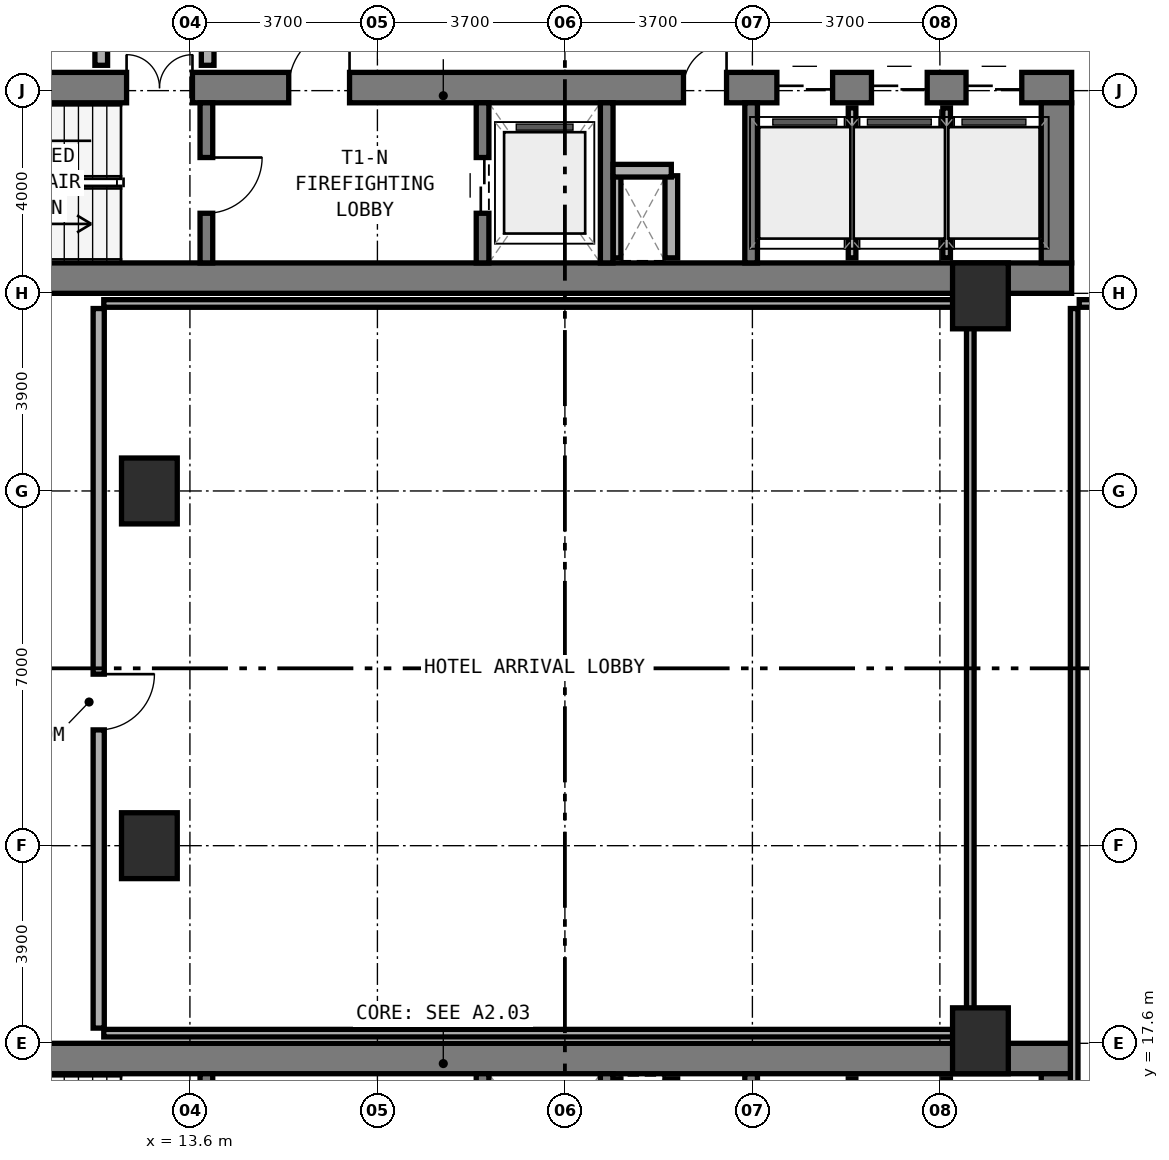
"""IFC4 building model, lengths in metres.
Left out: names, types, materials, properties, quantities, classifications, styles, units other than length and angle.
Written with IfcOpenShell. Run it as: python <this file> out.ifc"""

import sys

from ifc_helpers import new_model, si_unit, direction, frame, frame_2d, origin, origin_2d, place, context, subcontext, project, spatial, rectangle, extrude, element, fill, save


model = new_model("IFC4")
c1 = context("Model", 3, precision=1e-05, world=origin(), true_north=direction((0.0, 1.0)))
c2 = subcontext(c1, "Body", "Model", "MODEL_VIEW")
j1 = project(units=[si_unit("LENGTHUNIT", "METRE"), si_unit("PLANEANGLEUNIT", "RADIAN")], contexts=[c1])
p1 = place(None, origin())
s1 = spatial("IfcSite", under=j1, at=p1, CompositionType="ELEMENT")
p2 = place(p1, origin())
s2 = spatial("IfcBuilding", under=s1, at=p2, CompositionType="ELEMENT")
p3 = place(p2, origin())
s3 = spatial("IfcBuildingStorey", under=s2, at=p3, CompositionType="ELEMENT", Elevation=0.0)
p4 = place(p3, frame((6.2, 32.7, 0.0), z_axis=(0.0, 0.0, 1.0), x_axis=(1.0, 0.0, 0.0)))
e1 = element("IfcWall", 1, at=p4, inside=s3, PredefinedType="SHEAR", context=c2, shape_type="SweptSolid", body=[
    extrude(rectangle(XDim=24.8, YDim=0.6, at=frame_2d((12.4, 0.0))), origin(), (0.0, 0.0, 1.0), 5.4),
])
p5 = place(p3, frame((6.2, 36.46, 0.0), z_axis=(0.0, 0.0, 1.0), x_axis=(1.0, 0.0, 0.0)))
e2 = element("IfcWall", 2, at=p5, inside=s3, PredefinedType="SHEAR", context=c2, shape_type="SweptSolid", body=[
    extrude(rectangle(XDim=24.8, YDim=0.6, at=frame_2d((12.4, 0.0))), origin(), (0.0, 0.0, 1.0), 5.4),
])
p6 = place(p5, frame((9.35, 0.0, 0.0)))
e3 = element("IfcOpeningElement", 3, at=p6, cuts=e2, PredefinedType="OPENING", context=c2, shape_type="SweptSolid", body=[
    extrude(rectangle(XDim=1.2, YDim=2.15, at=frame_2d((0.6, 1.075))), frame((0.0, 0.31, 0.0), z_axis=(0.0, -1.0, 0.0), x_axis=(1.0, 0.0, 0.0)), (0.0, 0.0, 1.0), 0.62),
])
p7 = place(p5, frame((6.15, 0.0, 0.0)))
e4 = element("IfcOpeningElement", 4, at=p7, cuts=e2, PredefinedType="OPENING", context=c2, shape_type="SweptSolid", body=[
    extrude(rectangle(XDim=1.3, YDim=2.15, at=frame_2d((0.65, 1.075))), frame((0.0, 0.31, 0.0), z_axis=(0.0, -1.0, 0.0), x_axis=(1.0, 0.0, 0.0)), (0.0, 0.0, 1.0), 0.62),
])
p8 = place(p5, frame((17.14, 0.0, 0.0)))
e5 = element("IfcOpeningElement", 5, at=p8, cuts=e2, PredefinedType="OPENING", context=c2, shape_type="SweptSolid", body=[
    extrude(rectangle(XDim=0.85, YDim=2.1, at=frame_2d((0.425, 1.05))), frame((0.0, 0.31, 0.0), z_axis=(0.0, -1.0, 0.0), x_axis=(1.0, 0.0, 0.0)), (0.0, 0.0, 1.0), 0.62),
])
p9 = place(p5, frame((18.983, 0.0, 0.0)))
e6 = element("IfcOpeningElement", 6, at=p9, cuts=e2, PredefinedType="OPENING", context=c2, shape_type="SweptSolid", body=[
    extrude(rectangle(XDim=1.1, YDim=2.15, at=frame_2d((0.55, 1.075))), frame((0.0, 0.31, 0.0), z_axis=(0.0, -1.0, 0.0), x_axis=(1.0, 0.0, 0.0)), (0.0, 0.0, 1.0), 0.62),
])
p10 = place(p5, frame((20.85, 0.0, 0.0)))
e7 = element("IfcOpeningElement", 7, at=p10, cuts=e2, PredefinedType="OPENING", context=c2, shape_type="SweptSolid", body=[
    extrude(rectangle(XDim=1.1, YDim=2.15, at=frame_2d((0.55, 1.075))), frame((0.0, 0.31, 0.0), z_axis=(0.0, -1.0, 0.0), x_axis=(1.0, 0.0, 0.0)), (0.0, 0.0, 1.0), 0.62),
])
p11 = place(p5, frame((22.716, 0.0, 0.0)))
e8 = element("IfcOpeningElement", 8, at=p11, cuts=e2, PredefinedType="OPENING", context=c2, shape_type="SweptSolid", body=[
    extrude(rectangle(XDim=1.1, YDim=2.15, at=frame_2d((0.55, 1.075))), frame((0.0, 0.31, 0.0), z_axis=(0.0, -1.0, 0.0), x_axis=(1.0, 0.0, 0.0)), (0.0, 0.0, 1.0), 0.62),
])
p12 = place(p3, frame((30.7, 33.0, 0.0), z_axis=(0.0, 0.0, 1.0), x_axis=(0.0, 1.0, 0.0)))
e9 = element("IfcWall", 9, at=p12, inside=s3, PredefinedType="SHEAR", context=c2, shape_type="SweptSolid", body=[
    extrude(rectangle(XDim=3.16, YDim=0.6, at=frame_2d((1.58, 0.0))), origin(), (0.0, 0.0, 1.0), 5.4),
])
p13 = place(p3, frame((13.925, 33.0, 0.0), z_axis=(0.0, 0.0, 1.0), x_axis=(0.0, 1.0, 0.0)))
e10 = element("IfcWall", 10, at=p13, inside=s3, PredefinedType="STANDARD", context=c2, shape_type="SweptSolid", body=[
    extrude(rectangle(XDim=3.16, YDim=0.25, at=frame_2d((1.58, 0.0))), origin(), (0.0, 0.0, 1.0), 5.05),
])
p14 = place(p13, frame((0.98, 0.0, 0.0)))
e11 = element("IfcOpeningElement", 11, at=p14, cuts=e10, PredefinedType="OPENING", context=c2, shape_type="SweptSolid", body=[
    extrude(rectangle(XDim=1.1, YDim=2.15, at=frame_2d((0.55, 1.075))), frame((0.0, 0.135, 0.0), z_axis=(0.0, -1.0, 0.0), x_axis=(1.0, 0.0, 0.0)), (0.0, 0.0, 1.0), 0.27),
])
p15 = place(p3, frame((19.375, 33.0, 0.0), z_axis=(0.0, 0.0, 1.0), x_axis=(0.0, 1.0, 0.0)))
e12 = element("IfcWall", 12, at=p15, inside=s3, PredefinedType="STANDARD", context=c2, shape_type="SweptSolid", body=[
    extrude(rectangle(XDim=3.16, YDim=0.25, at=frame_2d((1.58, 0.0))), origin(), (0.0, 0.0, 1.0), 5.05),
])
p16 = place(p15, frame((0.98, 0.0, 0.0)))
e13 = element("IfcOpeningElement", 13, at=p16, cuts=e12, PredefinedType="OPENING", context=c2, shape_type="SweptSolid", body=[
    extrude(rectangle(XDim=1.1, YDim=2.15, at=frame_2d((0.55, 1.075))), frame((0.0, 0.135, 0.0), z_axis=(0.0, -1.0, 0.0), x_axis=(1.0, 0.0, 0.0)), (0.0, 0.0, 1.0), 0.27),
])
for number, where, z_axis, x_axis in (
    (14, (21.825, 33.0, 0.0), (0.0, 0.0, 1.0), (0.0, 1.0, 0.0)),
    (15, (24.675, 33.0, 0.0), (0.0, 0.0, 1.0), (0.0, 1.0, 0.0)),
):
    element("IfcWall", number, at=place(p3, frame(where, z_axis=z_axis, x_axis=x_axis)), inside=s3, PredefinedType="STANDARD", context=c2, shape_type="SweptSolid", body=[
        extrude(rectangle(XDim=3.16, YDim=0.25, at=frame_2d((1.58, 0.0))), origin(), (0.0, 0.0, 1.0), 5.05),
    ])
p17 = place(p3, frame((6.2, 17.3, 0.0), z_axis=(0.0, 0.0, 1.0), x_axis=(1.0, 0.0, 0.0)))
e16 = element("IfcWall", 16, at=p17, inside=s3, PredefinedType="SHEAR", context=c2, shape_type="SweptSolid", body=[
    extrude(rectangle(XDim=24.8, YDim=0.6, at=frame_2d((12.4, 0.0))), origin(), (0.0, 0.0, 1.0), 5.4),
])
p18 = place(p3, frame((30.7, 13.84, 0.0), z_axis=(0.0, 0.0, 1.0), x_axis=(0.0, 1.0, 0.0)))
e17 = element("IfcWall", 17, at=p18, inside=s3, PredefinedType="SHEAR", context=c2, shape_type="SweptSolid", body=[
    extrude(rectangle(XDim=3.16, YDim=0.6, at=frame_2d((1.58, 0.0))), origin(), (0.0, 0.0, 1.0), 5.4),
])
p19 = place(p3, frame((13.925, 13.84, 0.0), z_axis=(0.0, 0.0, 1.0), x_axis=(0.0, 1.0, 0.0)))
e18 = element("IfcWall", 18, at=p19, inside=s3, PredefinedType="STANDARD", context=c2, shape_type="SweptSolid", body=[
    extrude(rectangle(XDim=3.16, YDim=0.25, at=frame_2d((1.58, 0.0))), origin(), (0.0, 0.0, 1.0), 5.05),
])
p20 = place(p19, frame((0.98, 0.0, 0.0)))
e19 = element("IfcOpeningElement", 19, at=p20, cuts=e18, PredefinedType="OPENING", context=c2, shape_type="SweptSolid", body=[
    extrude(rectangle(XDim=1.1, YDim=2.15, at=frame_2d((0.55, 1.075))), frame((0.0, 0.135, 0.0), z_axis=(0.0, -1.0, 0.0), x_axis=(1.0, 0.0, 0.0)), (0.0, 0.0, 1.0), 0.27),
])
p21 = place(p3, frame((19.375, 13.84, 0.0), z_axis=(0.0, 0.0, 1.0), x_axis=(0.0, 1.0, 0.0)))
e20 = element("IfcWall", 20, at=p21, inside=s3, PredefinedType="STANDARD", context=c2, shape_type="SweptSolid", body=[
    extrude(rectangle(XDim=3.16, YDim=0.25, at=frame_2d((1.58, 0.0))), origin(), (0.0, 0.0, 1.0), 5.05),
])
p22 = place(p21, frame((0.98, 0.0, 0.0)))
e21 = element("IfcOpeningElement", 21, at=p22, cuts=e20, PredefinedType="OPENING", context=c2, shape_type="SweptSolid", body=[
    extrude(rectangle(XDim=1.1, YDim=2.15, at=frame_2d((0.55, 1.075))), frame((0.0, 0.135, 0.0), z_axis=(0.0, -1.0, 0.0), x_axis=(1.0, 0.0, 0.0)), (0.0, 0.0, 1.0), 0.27),
])
for number, where, z_axis, x_axis in (
    (22, (21.825, 13.84, 0.0), (0.0, 0.0, 1.0), (0.0, 1.0, 0.0)),
    (23, (24.675, 13.84, 0.0), (0.0, 0.0, 1.0), (0.0, 1.0, 0.0)),
):
    element("IfcWall", number, at=place(p3, frame(where, z_axis=z_axis, x_axis=x_axis)), inside=s3, PredefinedType="STANDARD", context=c2, shape_type="SweptSolid", body=[
        extrude(rectangle(XDim=3.16, YDim=0.25, at=frame_2d((1.58, 0.0))), origin(), (0.0, 0.0, 1.0), 5.05),
    ])
for number, where, z_axis, x_axis in (
    (24, (12.8, 21.5, 0.0), (0.0, 0.0, 1.0), (1.0, 0.0, 0.0)),
    (25, (12.8, 28.5, 0.0), (0.0, 0.0, 1.0), (1.0, 0.0, 0.0)),
    (26, (29.2, 17.65, 0.0), (0.0, 0.0, 1.0), (1.0, 0.0, 0.0)),
    (27, (29.2, 32.35, 0.0), (0.0, 0.0, 1.0), (1.0, 0.0, 0.0)),
):
    element("IfcColumn", number, at=place(p3, frame(where, z_axis=z_axis, x_axis=x_axis)), inside=s3, PredefinedType="COLUMN", context=c2, shape_type="SweptSolid", body=[
        extrude(rectangle(XDim=1.1, YDim=1.3, at=origin_2d()), origin(), (0.0, 0.0, 1.0), 5.4),
    ])
p23 = place(p3, frame((22.03, 33.1, 0.0), z_axis=(0.0, 0.0, 1.0), x_axis=(0.0, 1.0, 0.0)))
e28 = element("IfcWall", 28, at=p23, inside=s3, PredefinedType="PARTITIONING", context=c2, shape_type="SweptSolid", body=[
    extrude(rectangle(XDim=1.62, YDim=0.15, at=frame_2d((0.81, 0.0))), origin(), (0.0, 0.0, 1.0), 5.05),
])
p24 = place(p3, frame((23.1, 33.1, 0.0), z_axis=(0.0, 0.0, 1.0), x_axis=(0.0, 1.0, 0.0)))
e29 = element("IfcWall", 29, at=p24, inside=s3, PredefinedType="SOLIDWALL", context=c2, shape_type="SweptSolid", body=[
    extrude(rectangle(XDim=1.62, YDim=0.25, at=frame_2d((0.81, 0.0))), origin(), (0.0, 0.0, 1.0), 5.05),
])
p25 = place(p3, frame((21.95, 34.82, 0.0), z_axis=(0.0, 0.0, 1.0), x_axis=(1.0, 0.0, 0.0)))
e30 = element("IfcWall", 30, at=p25, inside=s3, PredefinedType="SOLIDWALL", context=c2, shape_type="SweptSolid", body=[
    extrude(rectangle(XDim=1.15, YDim=0.25, at=frame_2d((0.575, 0.0))), origin(), (0.0, 0.0, 1.0), 5.05),
])
p26 = place(p3, frame((26.667, 33.1, 0.0), z_axis=(0.0, 0.0, 1.0), x_axis=(0.0, 1.0, 0.0)))
e31 = element("IfcWall", 31, at=p26, inside=s3, PredefinedType="PARTITIONING", context=c2, shape_type="SweptSolid", body=[
    extrude(rectangle(XDim=2.96, YDim=0.15, at=frame_2d((1.48, 0.0))), origin(), (0.0, 0.0, 1.0), 5.05),
])
p27 = place(p3, frame((28.533, 33.1, 0.0), z_axis=(0.0, 0.0, 1.0), x_axis=(0.0, 1.0, 0.0)))
e32 = element("IfcWall", 32, at=p27, inside=s3, PredefinedType="PARTITIONING", context=c2, shape_type="SweptSolid", body=[
    extrude(rectangle(XDim=2.96, YDim=0.15, at=frame_2d((1.48, 0.0))), origin(), (0.0, 0.0, 1.0), 4.125),
])
p28 = place(p3, frame((22.03, 15.28, 0.0), z_axis=(0.0, 0.0, 1.0), x_axis=(0.0, 1.0, 0.0)))
e33 = element("IfcWall", 33, at=p28, inside=s3, PredefinedType="PARTITIONING", context=c2, shape_type="SweptSolid", body=[
    extrude(rectangle(XDim=1.62, YDim=0.15, at=frame_2d((0.81, 0.0))), origin(), (0.0, 0.0, 1.0), 5.05),
])
p29 = place(p3, frame((23.1, 15.28, 0.0), z_axis=(0.0, 0.0, 1.0), x_axis=(0.0, 1.0, 0.0)))
e34 = element("IfcWall", 34, at=p29, inside=s3, PredefinedType="SOLIDWALL", context=c2, shape_type="SweptSolid", body=[
    extrude(rectangle(XDim=1.62, YDim=0.25, at=frame_2d((0.81, 0.0))), origin(), (0.0, 0.0, 1.0), 5.05),
])
p30 = place(p3, frame((26.667, 13.94, 0.0), z_axis=(0.0, 0.0, 1.0), x_axis=(0.0, 1.0, 0.0)))
e35 = element("IfcWall", 35, at=p30, inside=s3, PredefinedType="PARTITIONING", context=c2, shape_type="SweptSolid", body=[
    extrude(rectangle(XDim=2.96, YDim=0.15, at=frame_2d((1.48, 0.0))), origin(), (0.0, 0.0, 1.0), 5.05),
])
p31 = place(p3, frame((28.533, 13.94, 0.0), z_axis=(0.0, 0.0, 1.0), x_axis=(0.0, 1.0, 0.0)))
e36 = element("IfcWall", 36, at=p31, inside=s3, PredefinedType="PARTITIONING", context=c2, shape_type="SweptSolid", body=[
    extrude(rectangle(XDim=2.96, YDim=0.15, at=frame_2d((1.48, 0.0))), origin(), (0.0, 0.0, 1.0), 4.125),
])
p32 = place(p3, frame((11.85, 36.9, 0.0), z_axis=(0.0, 0.0, 1.0), x_axis=(0.0, 1.0, 0.0)))
e37 = element("IfcWall", 37, at=p32, inside=s3, PredefinedType="SOLIDWALL", context=c2, shape_type="SweptSolid", body=[
    extrude(rectangle(XDim=12.65, YDim=0.25, at=frame_2d((6.325, 0.0))), origin(), (0.0, 0.0, 1.0), 4.225),
])
p33 = place(p32, frame((0.5, 0.0, 0.0)))
e38 = element("IfcOpeningElement", 38, at=p33, cuts=e37, PredefinedType="OPENING", context=c2, shape_type="SweptSolid", body=[
    extrude(rectangle(XDim=1.1, YDim=2.15, at=frame_2d((0.55, 1.075))), frame((0.0, 0.135, 0.0), z_axis=(0.0, -1.0, 0.0), x_axis=(1.0, 0.0, 0.0)), (0.0, 0.0, 1.0), 0.27),
])
p34 = place(p3, frame((13.95, 36.9, 0.0), z_axis=(0.0, 0.0, 1.0), x_axis=(0.0, 1.0, 0.0)))
e39 = element("IfcWall", 39, at=p34, inside=s3, PredefinedType="SOLIDWALL", context=c2, shape_type="SweptSolid", body=[
    extrude(rectangle(XDim=12.65, YDim=0.25, at=frame_2d((6.325, 0.0))), origin(), (0.0, 0.0, 1.0), 4.225),
])
p35 = place(p34, frame((0.5, 0.0, 0.0)))
e40 = element("IfcOpeningElement", 40, at=p35, cuts=e39, PredefinedType="OPENING", context=c2, shape_type="SweptSolid", body=[
    extrude(rectangle(XDim=1.1, YDim=2.15, at=frame_2d((0.55, 1.075))), frame((0.0, 0.135, 0.0), z_axis=(0.0, -1.0, 0.0), x_axis=(1.0, 0.0, 0.0)), (0.0, 0.0, 1.0), 0.27),
])
p36 = place(p3, frame((29.0, 17.9, 0.0), z_axis=(0.0, 0.0, 1.0), x_axis=(0.0, 1.0, 0.0)))
e41 = element("IfcWall", 41, at=p36, inside=s3, PredefinedType="PARTITIONING", context=c2, shape_type="SweptSolid", body=[
    extrude(rectangle(XDim=14.2, YDim=0.15, at=frame_2d((7.1, 0.0))), origin(), (0.0, 0.0, 1.0), 4.025),
])
for number, where, z_axis, x_axis in (
    (42, (11.9, 17.8, 0.0), (0.0, 0.0, 1.0), (1.0, 0.0, 0.0)),
    (43, (11.9, 32.2, 0.0), (0.0, 0.0, 1.0), (1.0, 0.0, 0.0)),
):
    element("IfcWall", number, at=place(p3, frame(where, z_axis=z_axis, x_axis=x_axis)), inside=s3, PredefinedType="PARTITIONING", context=c2, shape_type="SweptSolid", body=[
        extrude(rectangle(XDim=17.0, YDim=0.15, at=frame_2d((8.5, 0.0))), origin(), (0.0, 0.0, 1.0), 5.05),
    ])
p37 = place(p3, frame((11.8, 17.9, 0.0), z_axis=(0.0, 0.0, 1.0), x_axis=(0.0, 1.0, 0.0)))
e44 = element("IfcWall", 44, at=p37, inside=s3, PredefinedType="SOLIDWALL", context=c2, shape_type="SweptSolid", body=[
    extrude(rectangle(XDim=14.2, YDim=0.22, at=frame_2d((7.1, 0.0))), origin(), (0.0, 0.0, 1.0), 4.125),
])
p38 = place(p37, frame((5.885, 0.0, 0.0)))
e45 = element("IfcOpeningElement", 45, at=p38, cuts=e44, PredefinedType="OPENING", context=c2, shape_type="SweptSolid", body=[
    extrude(rectangle(XDim=1.1, YDim=2.1, at=frame_2d((0.55, 1.05))), frame((0.0, 0.12, 0.0), z_axis=(0.0, -1.0, 0.0), x_axis=(1.0, 0.0, 0.0)), (0.0, 0.0, 1.0), 0.24),
])
p39 = place(p3, frame((31.05, 13.35, 0.0), z_axis=(0.0, 0.0, 1.0), x_axis=(0.0, 1.0, 0.0)))
e46 = element("IfcWall", 46, at=p39, inside=s3, PredefinedType="PARTITIONING", context=c2, shape_type="SweptSolid", body=[
    extrude(rectangle(XDim=18.75, YDim=0.15, at=frame_2d((9.375, 0.0))), origin(), (0.0, 0.0, 1.0), 4.025),
])
p40 = place(p3, frame((31.15, 32.2, 0.0), z_axis=(0.0, 0.0, 1.0), x_axis=(1.0, 0.0, 0.0)))
e47 = element("IfcWall", 47, at=p40, inside=s3, PredefinedType="PARTITIONING", context=c2, shape_type="SweptSolid", body=[
    extrude(rectangle(XDim=9.75, YDim=0.15, at=frame_2d((4.875, 0.0))), origin(), (0.0, 0.0, 1.0), 4.125),
])
p41 = place(p14, frame((1.1, 0.0, 0.0), z_axis=(0.0, 0.0, 1.0), x_axis=(-1.0, 0.0, 0.0)))
e48 = element("IfcDoor", 48, at=p41, inside=s3, OperationType="SINGLE_SWING_LEFT", PredefinedType="DOOR", context=c2, shape_type="SweptSolid", body=[
    extrude(rectangle(XDim=1.1, YDim=2.15, at=frame_2d((0.55, 1.075))), frame((0.0, 0.025, 0.0), z_axis=(0.0, -1.0, 0.0), x_axis=(1.0, 0.0, 0.0)), (0.0, 0.0, 1.0), 0.05),
])
fill(e11, e48)
p42 = place(p6, origin())
e49 = element("IfcDoor", 49, at=p42, inside=s3, OperationType="SINGLE_SWING_RIGHT", PredefinedType="DOOR", context=c2, shape_type="SweptSolid", body=[
    extrude(rectangle(XDim=1.2, YDim=2.15, at=frame_2d((0.6, 1.075))), frame((0.0, 0.025, 0.0), z_axis=(0.0, -1.0, 0.0), x_axis=(1.0, 0.0, 0.0)), (0.0, 0.0, 1.0), 0.05),
])
fill(e3, e49)
p43 = place(p7, origin())
e50 = element("IfcDoor", 50, at=p43, inside=s3, OperationType="DOUBLE_DOOR_SINGLE_SWING", PredefinedType="DOOR", context=c2, shape_type="SweptSolid", body=[
    extrude(rectangle(XDim=1.3, YDim=2.15, at=frame_2d((0.65, 1.075))), frame((0.0, 0.025, 0.0), z_axis=(0.0, -1.0, 0.0), x_axis=(1.0, 0.0, 0.0)), (0.0, 0.0, 1.0), 0.05),
])
fill(e4, e50)
p44 = place(p16, origin())
e51 = element("IfcDoor", 51, at=p44, inside=s3, OperationType="DOUBLE_DOOR_SLIDING", PredefinedType="DOOR", context=c2, shape_type="SweptSolid", body=[
    extrude(rectangle(XDim=1.1, YDim=2.15, at=frame_2d((0.55, 1.075))), frame((0.0, 0.025, 0.0), z_axis=(0.0, -1.0, 0.0), x_axis=(1.0, 0.0, 0.0)), (0.0, 0.0, 1.0), 0.05),
])
fill(e13, e51)
p45 = place(p8, origin())
e52 = element("IfcDoor", 52, at=p45, inside=s3, OperationType="SINGLE_SWING_RIGHT", PredefinedType="DOOR", context=c2, shape_type="SweptSolid", body=[
    extrude(rectangle(XDim=0.85, YDim=2.1, at=frame_2d((0.425, 1.05))), frame((0.0, 0.025, 0.0), z_axis=(0.0, -1.0, 0.0), x_axis=(1.0, 0.0, 0.0)), (0.0, 0.0, 1.0), 0.05),
])
fill(e5, e52)
p46 = place(p9, origin())
e53 = element("IfcDoor", 53, at=p46, inside=s3, OperationType="DOUBLE_DOOR_SLIDING", PredefinedType="DOOR", context=c2, shape_type="SweptSolid", body=[
    extrude(rectangle(XDim=1.1, YDim=2.15, at=frame_2d((0.55, 1.075))), frame((0.0, 0.025, 0.0), z_axis=(0.0, -1.0, 0.0), x_axis=(1.0, 0.0, 0.0)), (0.0, 0.0, 1.0), 0.05),
])
fill(e6, e53)
p47 = place(p10, origin())
e54 = element("IfcDoor", 54, at=p47, inside=s3, OperationType="DOUBLE_DOOR_SLIDING", PredefinedType="DOOR", context=c2, shape_type="SweptSolid", body=[
    extrude(rectangle(XDim=1.1, YDim=2.15, at=frame_2d((0.55, 1.075))), frame((0.0, 0.025, 0.0), z_axis=(0.0, -1.0, 0.0), x_axis=(1.0, 0.0, 0.0)), (0.0, 0.0, 1.0), 0.05),
])
fill(e7, e54)
p48 = place(p11, origin())
e55 = element("IfcDoor", 55, at=p48, inside=s3, OperationType="DOUBLE_DOOR_SLIDING", PredefinedType="DOOR", context=c2, shape_type="SweptSolid", body=[
    extrude(rectangle(XDim=1.1, YDim=2.15, at=frame_2d((0.55, 1.075))), frame((0.0, 0.025, 0.0), z_axis=(0.0, -1.0, 0.0), x_axis=(1.0, 0.0, 0.0)), (0.0, 0.0, 1.0), 0.05),
])
fill(e8, e55)
p49 = place(p38, frame((1.1, 0.0, 0.0), z_axis=(0.0, 0.0, 1.0), x_axis=(-1.0, 0.0, 0.0)))
e56 = element("IfcDoor", 56, at=p49, inside=s3, OperationType="SINGLE_SWING_LEFT", PredefinedType="DOOR", context=c2, shape_type="SweptSolid", body=[
    extrude(rectangle(XDim=1.1, YDim=2.1, at=frame_2d((0.55, 1.05))), frame((0.0, 0.025, 0.0), z_axis=(0.0, -1.0, 0.0), x_axis=(1.0, 0.0, 0.0)), (0.0, 0.0, 1.0), 0.05),
])
fill(e45, e56)
save(model, sys.argv[1])
